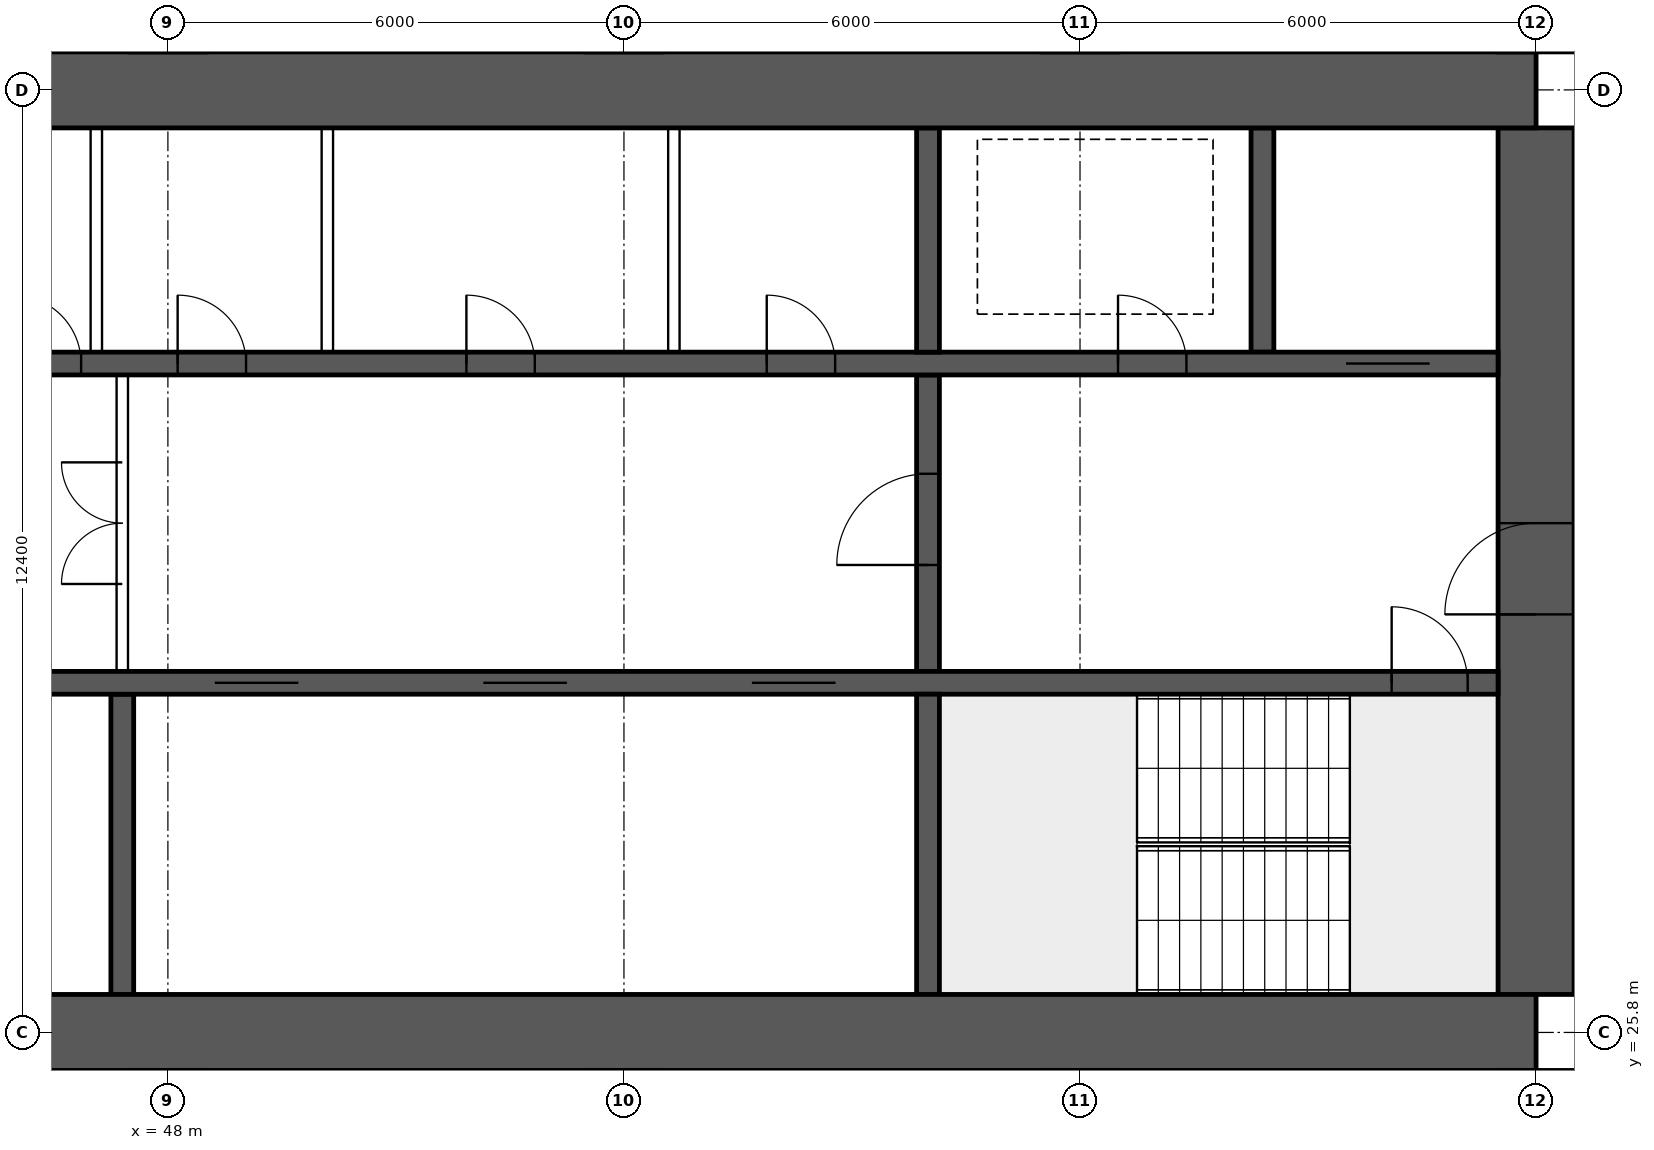
"""IFC4 building model, lengths in metres.
Left out: names, types, materials, properties, quantities, classifications, styles, units other than length and angle.
Written with IfcOpenShell. Run it as: python <this file> out.ifc"""

import sys

from ifc_helpers import new_model, si_unit, direction, frame, frame_2d, origin, place, context, subcontext, project, spatial, rectangle, extrude, element, fill, save


model = new_model("IFC4")
c1 = context("Model", 3, precision=1e-05, world=origin(), true_north=direction((0.0, 1.0)))
c2 = subcontext(c1, "Body", "Model", "MODEL_VIEW")
j1 = project(units=[si_unit("LENGTHUNIT", "METRE"), si_unit("PLANEANGLEUNIT", "RADIAN")], contexts=[c1])
p1 = place(None, origin())
s1 = spatial("IfcSite", under=j1, at=p1, CompositionType="ELEMENT")
p2 = place(p1, origin())
s2 = spatial("IfcBuilding", under=s1, at=p2, CompositionType="ELEMENT")
p3 = place(p2, frame((0.0, 0.0, 50.2)))
s3 = spatial("IfcBuildingStorey", under=s2, at=p3, CompositionType="ELEMENT", Elevation=50.2)
for number, where, z_axis, x_axis in (
    (1, (18.0, 25.8, 0.0), (0.0, 0.0, 1.0), (1.0, 0.0, 0.0)),
    (2, (18.0, 38.2, 0.0), (0.0, 0.0, 1.0), (1.0, 0.0, 0.0)),
):
    element("IfcWall", number, at=place(p3, frame(where, z_axis=z_axis, x_axis=x_axis)), inside=s3, PredefinedType="SHEAR", context=c2, shape_type="SweptSolid", body=[
        extrude(rectangle(XDim=48.0, YDim=1.0, at=frame_2d((24.0, 0.0))), origin(), (0.0, 0.0, 1.0), 3.75),
    ])
p4 = place(p3, frame((66.0, 26.3, 0.0), z_axis=(0.0, 0.0, 1.0), x_axis=(0.0, 1.0, 0.0)))
e3 = element("IfcWall", 3, at=p4, inside=s3, PredefinedType="SHEAR", context=c2, shape_type="SweptSolid", body=[
    extrude(rectangle(XDim=11.4, YDim=1.0, at=frame_2d((5.7, 0.0))), origin(), (0.0, 0.0, 1.0), 3.75),
])
p5 = place(p4, frame((5.0, 0.0, 0.0)))
e4 = element("IfcOpeningElement", 4, at=p5, cuts=e3, PredefinedType="OPENING", context=c2, shape_type="SweptSolid", body=[
    extrude(rectangle(XDim=1.2, YDim=2.1, at=frame_2d((0.6, 1.05))), frame((0.0, 0.51, 0.0), z_axis=(0.0, -1.0, 0.0), x_axis=(1.0, 0.0, 0.0)), (0.0, 0.0, 1.0), 1.02),
])
p6 = place(p3, frame((18.5, 30.4, 0.0), z_axis=(0.0, 0.0, 1.0), x_axis=(1.0, 0.0, 0.0)))
e5 = element("IfcWall", 5, at=p6, inside=s3, PredefinedType="SHEAR", context=c2, shape_type="SweptSolid", body=[
    extrude(rectangle(XDim=47.0, YDim=0.3, at=frame_2d((23.5, 0.0))), origin(), (0.0, 0.0, 1.0), 3.75),
])
p7 = place(p6, frame((0.4, 0.0, 0.0)))
e6 = element("IfcOpeningElement", 6, at=p7, cuts=e5, PredefinedType="OPENING", context=c2, shape_type="SweptSolid", body=[
    extrude(rectangle(XDim=1.0, YDim=2.1, at=frame_2d((0.5, 1.05))), frame((0.0, 0.16, 0.0), z_axis=(0.0, -1.0, 0.0), x_axis=(1.0, 0.0, 0.0)), (0.0, 0.0, 1.0), 0.32),
])
p8 = place(p6, frame((45.6, 0.0, 0.0)))
e7 = element("IfcOpeningElement", 7, at=p8, cuts=e5, PredefinedType="OPENING", context=c2, shape_type="SweptSolid", body=[
    extrude(rectangle(XDim=1.0, YDim=2.1, at=frame_2d((0.5, 1.05))), frame((0.0, 0.16, 0.0), z_axis=(0.0, -1.0, 0.0), x_axis=(1.0, 0.0, 0.0)), (0.0, 0.0, 1.0), 0.32),
])
p9 = place(p6, frame((8.25, 0.0, 0.0)))
e8 = element("IfcOpeningElement", 8, at=p9, cuts=e5, PredefinedType="OPENING", context=c2, shape_type="SweptSolid", body=[
    extrude(rectangle(XDim=1.1, YDim=2.1, at=frame_2d((0.55, 1.05))), frame((0.0, 0.16, 0.0), z_axis=(0.0, -1.0, 0.0), x_axis=(1.0, 0.0, 0.0)), (0.0, 0.0, 1.0), 0.32),
])
p10 = place(p6, frame((10.85, 0.0, 0.0)))
e9 = element("IfcOpeningElement", 9, at=p10, cuts=e5, PredefinedType="OPENING", context=c2, shape_type="SweptSolid", body=[
    extrude(rectangle(XDim=1.1, YDim=2.1, at=frame_2d((0.55, 1.05))), frame((0.0, 0.16, 0.0), z_axis=(0.0, -1.0, 0.0), x_axis=(1.0, 0.0, 0.0)), (0.0, 0.0, 1.0), 0.32),
])
p11 = place(p6, frame((13.45, 0.0, 0.0)))
e10 = element("IfcOpeningElement", 10, at=p11, cuts=e5, PredefinedType="OPENING", context=c2, shape_type="SweptSolid", body=[
    extrude(rectangle(XDim=1.1, YDim=2.1, at=frame_2d((0.55, 1.05))), frame((0.0, 0.16, 0.0), z_axis=(0.0, -1.0, 0.0), x_axis=(1.0, 0.0, 0.0)), (0.0, 0.0, 1.0), 0.32),
])
p12 = place(p6, frame((16.05, 0.0, 0.0)))
e11 = element("IfcOpeningElement", 11, at=p12, cuts=e5, PredefinedType="OPENING", context=c2, shape_type="SweptSolid", body=[
    extrude(rectangle(XDim=1.1, YDim=2.1, at=frame_2d((0.55, 1.05))), frame((0.0, 0.16, 0.0), z_axis=(0.0, -1.0, 0.0), x_axis=(1.0, 0.0, 0.0)), (0.0, 0.0, 1.0), 0.32),
])
p13 = place(p6, frame((30.117, 0.0, 0.0)))
e12 = element("IfcOpeningElement", 12, at=p13, cuts=e5, PredefinedType="OPENING", context=c2, shape_type="SweptSolid", body=[
    extrude(rectangle(XDim=1.1, YDim=2.1, at=frame_2d((0.55, 1.05))), frame((0.0, 0.16, 0.0), z_axis=(0.0, -1.0, 0.0), x_axis=(1.0, 0.0, 0.0)), (0.0, 0.0, 1.0), 0.32),
])
p14 = place(p6, frame((33.65, 0.0, 0.0)))
e13 = element("IfcOpeningElement", 13, at=p14, cuts=e5, PredefinedType="OPENING", context=c2, shape_type="SweptSolid", body=[
    extrude(rectangle(XDim=1.1, YDim=2.1, at=frame_2d((0.55, 1.05))), frame((0.0, 0.16, 0.0), z_axis=(0.0, -1.0, 0.0), x_axis=(1.0, 0.0, 0.0)), (0.0, 0.0, 1.0), 0.32),
])
p15 = place(p6, frame((37.183, 0.0, 0.0)))
e14 = element("IfcOpeningElement", 14, at=p15, cuts=e5, PredefinedType="OPENING", context=c2, shape_type="SweptSolid", body=[
    extrude(rectangle(XDim=1.1, YDim=2.1, at=frame_2d((0.55, 1.05))), frame((0.0, 0.16, 0.0), z_axis=(0.0, -1.0, 0.0), x_axis=(1.0, 0.0, 0.0)), (0.0, 0.0, 1.0), 0.32),
])
p16 = place(p3, frame((18.5, 34.6, 0.0), z_axis=(0.0, 0.0, 1.0), x_axis=(1.0, 0.0, 0.0)))
e15 = element("IfcWall", 15, at=p16, inside=s3, PredefinedType="SHEAR", context=c2, shape_type="SweptSolid", body=[
    extrude(rectangle(XDim=47.0, YDim=0.3, at=frame_2d((23.5, 0.0))), origin(), (0.0, 0.0, 1.0), 3.75),
])
p17 = place(p16, frame((0.9, 0.0, 0.0)))
e16 = element("IfcOpeningElement", 16, at=p17, cuts=e15, PredefinedType="OPENING", context=c2, shape_type="SweptSolid", body=[
    extrude(rectangle(XDim=1.1, YDim=2.1, at=frame_2d((0.55, 1.05))), frame((0.0, 0.16, 0.0), z_axis=(0.0, -1.0, 0.0), x_axis=(1.0, 0.0, 0.0)), (0.0, 0.0, 1.0), 0.32),
])
p18 = place(p16, frame((45.0, 0.0, 0.0)))
e17 = element("IfcOpeningElement", 17, at=p18, cuts=e15, PredefinedType="OPENING", context=c2, shape_type="SweptSolid", body=[
    extrude(rectangle(XDim=1.1, YDim=2.1, at=frame_2d((0.55, 1.05))), frame((0.0, 0.16, 0.0), z_axis=(0.0, -1.0, 0.0), x_axis=(1.0, 0.0, 0.0)), (0.0, 0.0, 1.0), 0.32),
])
p19 = place(p16, frame((4.1, 0.0, 0.0)))
e18 = element("IfcOpeningElement", 18, at=p19, cuts=e15, PredefinedType="OPENING", context=c2, shape_type="SweptSolid", body=[
    extrude(rectangle(XDim=0.9, YDim=2.1, at=frame_2d((0.45, 1.05))), frame((0.0, 0.16, 0.0), z_axis=(0.0, -1.0, 0.0), x_axis=(1.0, 0.0, 0.0)), (0.0, 0.0, 1.0), 0.32),
])
p20 = place(p16, frame((42.0, 0.0, 0.0)))
e19 = element("IfcOpeningElement", 19, at=p20, cuts=e15, PredefinedType="OPENING", context=c2, shape_type="SweptSolid", body=[
    extrude(rectangle(XDim=0.9, YDim=2.1, at=frame_2d((0.45, 1.05))), frame((0.0, 0.16, 0.0), z_axis=(0.0, -1.0, 0.0), x_axis=(1.0, 0.0, 0.0)), (0.0, 0.0, 1.0), 0.32),
])
p21 = place(p16, frame((8.875, 0.0, 0.0)))
e20 = element("IfcOpeningElement", 20, at=p21, cuts=e15, PredefinedType="OPENING", context=c2, shape_type="SweptSolid", body=[
    extrude(rectangle(XDim=0.9, YDim=2.1, at=frame_2d((0.45, 1.05))), frame((0.0, 0.16, 0.0), z_axis=(0.0, -1.0, 0.0), x_axis=(1.0, 0.0, 0.0)), (0.0, 0.0, 1.0), 0.32),
])
p22 = place(p16, frame((12.849, 0.0, 0.0)))
e21 = element("IfcOpeningElement", 21, at=p22, cuts=e15, PredefinedType="OPENING", context=c2, shape_type="SweptSolid", body=[
    extrude(rectangle(XDim=0.9, YDim=2.1, at=frame_2d((0.45, 1.05))), frame((0.0, 0.16, 0.0), z_axis=(0.0, -1.0, 0.0), x_axis=(1.0, 0.0, 0.0)), (0.0, 0.0, 1.0), 0.32),
])
p23 = place(p16, frame((16.496, 0.0, 0.0)))
e22 = element("IfcOpeningElement", 22, at=p23, cuts=e15, PredefinedType="OPENING", context=c2, shape_type="SweptSolid", body=[
    extrude(rectangle(XDim=0.9, YDim=2.1, at=frame_2d((0.45, 1.05))), frame((0.0, 0.16, 0.0), z_axis=(0.0, -1.0, 0.0), x_axis=(1.0, 0.0, 0.0)), (0.0, 0.0, 1.0), 0.32),
])
p24 = place(p16, frame((20.255, 0.0, 0.0)))
e23 = element("IfcOpeningElement", 23, at=p24, cuts=e15, PredefinedType="OPENING", context=c2, shape_type="SweptSolid", body=[
    extrude(rectangle(XDim=0.9, YDim=2.1, at=frame_2d((0.45, 1.05))), frame((0.0, 0.16, 0.0), z_axis=(0.0, -1.0, 0.0), x_axis=(1.0, 0.0, 0.0)), (0.0, 0.0, 1.0), 0.32),
])
p25 = place(p16, frame((24.661, 0.0, 0.0)))
e24 = element("IfcOpeningElement", 24, at=p25, cuts=e15, PredefinedType="OPENING", context=c2, shape_type="SweptSolid", body=[
    extrude(rectangle(XDim=0.9, YDim=2.1, at=frame_2d((0.45, 1.05))), frame((0.0, 0.16, 0.0), z_axis=(0.0, -1.0, 0.0), x_axis=(1.0, 0.0, 0.0)), (0.0, 0.0, 1.0), 0.32),
])
p26 = place(p16, frame((27.458, 0.0, 0.0)))
e25 = element("IfcOpeningElement", 25, at=p26, cuts=e15, PredefinedType="OPENING", context=c2, shape_type="SweptSolid", body=[
    extrude(rectangle(XDim=0.9, YDim=2.1, at=frame_2d((0.45, 1.05))), frame((0.0, 0.16, 0.0), z_axis=(0.0, -1.0, 0.0), x_axis=(1.0, 0.0, 0.0)), (0.0, 0.0, 1.0), 0.32),
])
p27 = place(p16, frame((29.628, 0.0, 0.0)))
e26 = element("IfcOpeningElement", 26, at=p27, cuts=e15, PredefinedType="OPENING", context=c2, shape_type="SweptSolid", body=[
    extrude(rectangle(XDim=0.9, YDim=2.1, at=frame_2d((0.45, 1.05))), frame((0.0, 0.16, 0.0), z_axis=(0.0, -1.0, 0.0), x_axis=(1.0, 0.0, 0.0)), (0.0, 0.0, 1.0), 0.32),
])
p28 = place(p16, frame((33.427, 0.0, 0.0)))
e27 = element("IfcOpeningElement", 27, at=p28, cuts=e15, PredefinedType="OPENING", context=c2, shape_type="SweptSolid", body=[
    extrude(rectangle(XDim=0.9, YDim=2.1, at=frame_2d((0.45, 1.05))), frame((0.0, 0.16, 0.0), z_axis=(0.0, -1.0, 0.0), x_axis=(1.0, 0.0, 0.0)), (0.0, 0.0, 1.0), 0.32),
])
p29 = place(p16, frame((37.378, 0.0, 0.0)))
e28 = element("IfcOpeningElement", 28, at=p29, cuts=e15, PredefinedType="OPENING", context=c2, shape_type="SweptSolid", body=[
    extrude(rectangle(XDim=0.9, YDim=2.1, at=frame_2d((0.45, 1.05))), frame((0.0, 0.16, 0.0), z_axis=(0.0, -1.0, 0.0), x_axis=(1.0, 0.0, 0.0)), (0.0, 0.0, 1.0), 0.32),
])
p30 = place(p3, frame((58.0, 26.3, 0.0), z_axis=(0.0, 0.0, 1.0), x_axis=(0.0, 1.0, 0.0)))
e29 = element("IfcWall", 29, at=p30, inside=s3, PredefinedType="SHEAR", context=c2, shape_type="SweptSolid", body=[
    extrude(rectangle(XDim=3.95, YDim=0.3, at=frame_2d((1.975, 0.0))), origin(), (0.0, 0.0, 1.0), 3.75),
])
p31 = place(p3, frame((58.0, 30.55, 0.0), z_axis=(0.0, 0.0, 1.0), x_axis=(0.0, 1.0, 0.0)))
e30 = element("IfcWall", 30, at=p31, inside=s3, PredefinedType="SHEAR", context=c2, shape_type="SweptSolid", body=[
    extrude(rectangle(XDim=3.9, YDim=0.3, at=frame_2d((1.95, 0.0))), origin(), (0.0, 0.0, 1.0), 3.75),
])
p32 = place(p31, frame((1.4, 0.0, 0.0)))
e31 = element("IfcOpeningElement", 31, at=p32, cuts=e30, PredefinedType="OPENING", context=c2, shape_type="SweptSolid", body=[
    extrude(rectangle(XDim=1.2, YDim=2.1, at=frame_2d((0.6, 1.05))), frame((0.0, 0.16, 0.0), z_axis=(0.0, -1.0, 0.0), x_axis=(1.0, 0.0, 0.0)), (0.0, 0.0, 1.0), 0.32),
])
for number, where, z_axis, x_axis in (
    (32, (62.4, 34.75, 0.0), (0.0, 0.0, 1.0), (0.0, 1.0, 0.0)),
    (33, (58.0, 34.75, 0.0), (0.0, 0.0, 1.0), (0.0, 1.0, 0.0)),
):
    element("IfcWall", number, at=place(p3, frame(where, z_axis=z_axis, x_axis=x_axis)), inside=s3, PredefinedType="SHEAR", context=c2, shape_type="SweptSolid", body=[
        extrude(rectangle(XDim=2.95, YDim=0.3, at=frame_2d((1.475, 0.0))), origin(), (0.0, 0.0, 1.0), 3.75),
    ])
p33 = place(p3, frame((47.4, 26.3, 0.0), z_axis=(0.0, 0.0, 1.0), x_axis=(0.0, 1.0, 0.0)))
e34 = element("IfcWall", 34, at=p33, inside=s3, PredefinedType="SHEAR", context=c2, shape_type="SweptSolid", body=[
    extrude(rectangle(XDim=3.95, YDim=0.3, at=frame_2d((1.975, 0.0))), origin(), (0.0, 0.0, 1.0), 3.75),
])
p34 = place(p3, frame((47.4, 30.55, 0.0), z_axis=(0.0, 0.0, 1.0), x_axis=(0.0, 1.0, 0.0)))
e35 = element("IfcWall", 35, at=p34, inside=s3, PredefinedType="SOLIDWALL", context=c2, shape_type="SweptSolid", body=[
    extrude(rectangle(XDim=3.9, YDim=0.15, at=frame_2d((1.95, 0.0))), origin(), (0.0, 0.0, 1.0), 3.3),
])
p35 = place(p34, frame((1.15, 0.0, 0.0)))
e36 = element("IfcOpeningElement", 36, at=p35, cuts=e35, PredefinedType="OPENING", context=c2, shape_type="SweptSolid", body=[
    extrude(rectangle(XDim=1.6, YDim=2.1, at=frame_2d((0.8, 1.05))), frame((0.0, 0.085, 0.0), z_axis=(0.0, -1.0, 0.0), x_axis=(1.0, 0.0, 0.0)), (0.0, 0.0, 1.0), 0.17),
])
for number, where, z_axis, x_axis in (
    (37, (47.058, 34.75, 0.0), (0.0, 0.0, 1.0), (0.0, 1.0, 0.0)),
    (38, (50.098, 34.75, 0.0), (0.0, 0.0, 1.0), (0.0, 1.0, 0.0)),
    (39, (54.657, 34.75, 0.0), (0.0, 0.0, 1.0), (0.0, 1.0, 0.0)),
):
    element("IfcWall", number, at=place(p3, frame(where, z_axis=z_axis, x_axis=x_axis)), inside=s3, PredefinedType="SOLIDWALL", context=c2, shape_type="SweptSolid", body=[
        extrude(rectangle(XDim=2.95, YDim=0.15, at=frame_2d((1.475, 0.0))), origin(), (0.0, 0.0, 1.0), 3.3),
    ])
p36 = place(p35, origin())
e40 = element("IfcDoor", 40, at=p36, inside=s3, OperationType="DOUBLE_DOOR_SINGLE_SWING", PredefinedType="DOOR", context=c2, shape_type="SweptSolid", body=[
    extrude(rectangle(XDim=1.6, YDim=2.1, at=frame_2d((0.8, 1.05))), frame((0.0, 0.025, 0.0), z_axis=(0.0, -1.0, 0.0), x_axis=(1.0, 0.0, 0.0)), (0.0, 0.0, 1.0), 0.05),
])
fill(e36, e40)
p37 = place(p5, origin())
e41 = element("IfcDoor", 41, at=p37, inside=s3, OperationType="SINGLE_SWING_LEFT", PredefinedType="DOOR", context=c2, shape_type="SweptSolid", body=[
    extrude(rectangle(XDim=1.2, YDim=2.1, at=frame_2d((0.6, 1.05))), frame((0.0, 0.025, 0.0), z_axis=(0.0, -1.0, 0.0), x_axis=(1.0, 0.0, 0.0)), (0.0, 0.0, 1.0), 0.05),
])
fill(e4, e41)
p38 = place(p8, origin())
e42 = element("IfcDoor", 42, at=p38, inside=s3, OperationType="SINGLE_SWING_LEFT", PredefinedType="DOOR", context=c2, shape_type="SweptSolid", body=[
    extrude(rectangle(XDim=1.0, YDim=2.1, at=frame_2d((0.5, 1.05))), frame((0.0, 0.025, 0.0), z_axis=(0.0, -1.0, 0.0), x_axis=(1.0, 0.0, 0.0)), (0.0, 0.0, 1.0), 0.05),
])
fill(e7, e42)
p39 = place(p18, origin())
e43 = element("IfcDoor", 43, at=p39, inside=s3, OperationType="DOUBLE_DOOR_SLIDING", PredefinedType="DOOR", context=c2, shape_type="SweptSolid", body=[
    extrude(rectangle(XDim=1.1, YDim=2.1, at=frame_2d((0.55, 1.05))), frame((0.0, 0.025, 0.0), z_axis=(0.0, -1.0, 0.0), x_axis=(1.0, 0.0, 0.0)), (0.0, 0.0, 1.0), 0.05),
])
fill(e17, e43)
p40 = place(p20, origin())
e44 = element("IfcDoor", 44, at=p40, inside=s3, OperationType="SINGLE_SWING_LEFT", PredefinedType="DOOR", context=c2, shape_type="SweptSolid", body=[
    extrude(rectangle(XDim=0.9, YDim=2.1, at=frame_2d((0.45, 1.05))), frame((0.0, 0.025, 0.0), z_axis=(0.0, -1.0, 0.0), x_axis=(1.0, 0.0, 0.0)), (0.0, 0.0, 1.0), 0.05),
])
fill(e19, e44)
p41 = place(p32, origin())
e45 = element("IfcDoor", 45, at=p41, inside=s3, OperationType="SINGLE_SWING_LEFT", PredefinedType="DOOR", context=c2, shape_type="SweptSolid", body=[
    extrude(rectangle(XDim=1.2, YDim=2.1, at=frame_2d((0.6, 1.05))), frame((0.0, 0.025, 0.0), z_axis=(0.0, -1.0, 0.0), x_axis=(1.0, 0.0, 0.0)), (0.0, 0.0, 1.0), 0.05),
])
fill(e31, e45)
p42 = place(p26, origin())
e46 = element("IfcDoor", 46, at=p42, inside=s3, OperationType="SINGLE_SWING_LEFT", PredefinedType="DOOR", context=c2, shape_type="SweptSolid", body=[
    extrude(rectangle(XDim=0.9, YDim=2.1, at=frame_2d((0.45, 1.05))), frame((0.0, 0.025, 0.0), z_axis=(0.0, -1.0, 0.0), x_axis=(1.0, 0.0, 0.0)), (0.0, 0.0, 1.0), 0.05),
])
fill(e25, e46)
p43 = place(p27, origin())
e47 = element("IfcDoor", 47, at=p43, inside=s3, OperationType="SINGLE_SWING_LEFT", PredefinedType="DOOR", context=c2, shape_type="SweptSolid", body=[
    extrude(rectangle(XDim=0.9, YDim=2.1, at=frame_2d((0.45, 1.05))), frame((0.0, 0.025, 0.0), z_axis=(0.0, -1.0, 0.0), x_axis=(1.0, 0.0, 0.0)), (0.0, 0.0, 1.0), 0.05),
])
fill(e26, e47)
p44 = place(p28, origin())
e48 = element("IfcDoor", 48, at=p44, inside=s3, OperationType="SINGLE_SWING_LEFT", PredefinedType="DOOR", context=c2, shape_type="SweptSolid", body=[
    extrude(rectangle(XDim=0.9, YDim=2.1, at=frame_2d((0.45, 1.05))), frame((0.0, 0.025, 0.0), z_axis=(0.0, -1.0, 0.0), x_axis=(1.0, 0.0, 0.0)), (0.0, 0.0, 1.0), 0.05),
])
fill(e27, e48)
p45 = place(p29, origin())
e49 = element("IfcDoor", 49, at=p45, inside=s3, OperationType="SINGLE_SWING_LEFT", PredefinedType="DOOR", context=c2, shape_type="SweptSolid", body=[
    extrude(rectangle(XDim=0.9, YDim=2.1, at=frame_2d((0.45, 1.05))), frame((0.0, 0.025, 0.0), z_axis=(0.0, -1.0, 0.0), x_axis=(1.0, 0.0, 0.0)), (0.0, 0.0, 1.0), 0.05),
])
fill(e28, e49)
p46 = place(p13, origin())
e50 = element("IfcDoor", 50, at=p46, inside=s3, OperationType="DOUBLE_DOOR_SLIDING", PredefinedType="DOOR", context=c2, shape_type="SweptSolid", body=[
    extrude(rectangle(XDim=1.1, YDim=2.1, at=frame_2d((0.55, 1.05))), frame((0.0, 0.025, 0.0), z_axis=(0.0, -1.0, 0.0), x_axis=(1.0, 0.0, 0.0)), (0.0, 0.0, 1.0), 0.05),
])
fill(e12, e50)
p47 = place(p14, origin())
e51 = element("IfcDoor", 51, at=p47, inside=s3, OperationType="DOUBLE_DOOR_SLIDING", PredefinedType="DOOR", context=c2, shape_type="SweptSolid", body=[
    extrude(rectangle(XDim=1.1, YDim=2.1, at=frame_2d((0.55, 1.05))), frame((0.0, 0.025, 0.0), z_axis=(0.0, -1.0, 0.0), x_axis=(1.0, 0.0, 0.0)), (0.0, 0.0, 1.0), 0.05),
])
fill(e13, e51)
p48 = place(p15, origin())
e52 = element("IfcDoor", 52, at=p48, inside=s3, OperationType="DOUBLE_DOOR_SLIDING", PredefinedType="DOOR", context=c2, shape_type="SweptSolid", body=[
    extrude(rectangle(XDim=1.1, YDim=2.1, at=frame_2d((0.55, 1.05))), frame((0.0, 0.025, 0.0), z_axis=(0.0, -1.0, 0.0), x_axis=(1.0, 0.0, 0.0)), (0.0, 0.0, 1.0), 0.05),
])
fill(e14, e52)
save(model, sys.argv[1])
